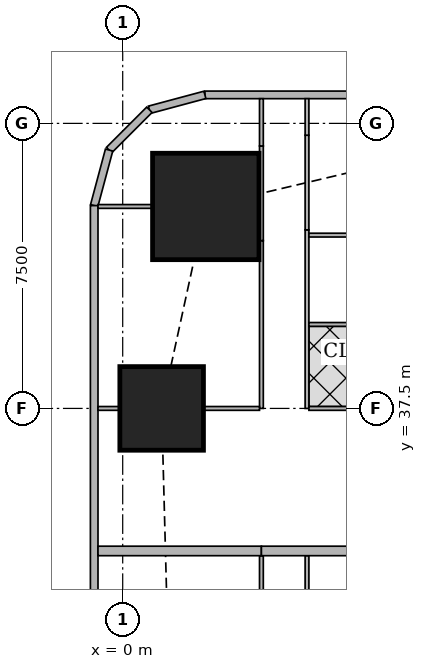
"""IFC4 building model, lengths in metres.
Left out: names, types, materials, properties, quantities, classifications, styles, units other than length and angle.
Written with IfcOpenShell. Run it as: python <this file> out.ifc"""

import sys

from ifc_helpers import new_model, si_unit, direction, frame, frame_2d, origin, origin_2d, place, context, subcontext, project, spatial, rectangle, extrude, element, fill, save


model = new_model("IFC4")
c1 = context("Model", 3, precision=1e-05, world=origin(), true_north=direction((0.0, 1.0)))
c2 = subcontext(c1, "Body", "Model", "MODEL_VIEW")
j1 = project(units=[si_unit("LENGTHUNIT", "METRE"), si_unit("PLANEANGLEUNIT", "RADIAN")], contexts=[c1])
p1 = place(None, origin())
s1 = spatial("IfcSite", under=j1, at=p1, CompositionType="ELEMENT")
p2 = place(p1, origin())
s2 = spatial("IfcBuilding", under=s1, at=p2, CompositionType="ELEMENT")
p3 = place(p2, frame((0.0, 0.0, 81.65)))
s3 = spatial("IfcBuildingStorey", under=s2, at=p3, CompositionType="ELEMENT", Elevation=81.65)
p4 = place(p3, frame((1.025, 37.5, 0.0), z_axis=(0.0, 0.0, 1.0), x_axis=(1.0, 0.0, 0.0)))
e1 = element("IfcColumn", 1, at=p4, inside=s3, PredefinedType="COLUMN", context=c2, shape_type="SweptSolid", body=[
    extrude(rectangle(XDim=2.2, YDim=2.2, at=origin_2d()), origin(), (0.0, 0.0, 1.0), 3.75),
])
p5 = place(p3, frame((2.186, 42.814, 0.0), z_axis=(0.0, 0.0, 1.0), x_axis=(1.0, 0.0, 0.0)))
e2 = element("IfcColumn", 2, at=p5, inside=s3, PredefinedType="COLUMN", context=c2, shape_type="SweptSolid", body=[
    extrude(rectangle(XDim=2.8, YDim=2.8, at=origin_2d()), origin(), (0.0, 0.0, 1.0), 3.75),
])
p6 = place(p3, frame((40.106, 45.75, 0.0), z_axis=(0.0, 0.0, 1.0), x_axis=(-1.0, 0.0, 0.0)))
e3 = element("IfcWall", 3, at=p6, inside=s3, PredefinedType="SOLIDWALL", context=c2, shape_type="SweptSolid", body=[
    extrude(rectangle(XDim=37.943, YDim=0.2, at=frame_2d((18.971, 0.0))), origin(), (0.0, 0.0, 1.0), 3.5),
])
p7 = place(p6, frame((8.606, 0.0, 0.9)))
e4 = element("IfcOpeningElement", 4, at=p7, cuts=e3, PredefinedType="OPENING", context=c2, shape_type="SweptSolid", body=[
    extrude(rectangle(XDim=1.8, YDim=1.5, at=frame_2d((0.9, 0.75))), frame((0.0, 0.11, 0.0), z_axis=(0.0, -1.0, 0.0), x_axis=(1.0, 0.0, 0.0)), (0.0, 0.0, 1.0), 0.22),
])
p8 = place(p6, frame((12.206, 0.0, 0.9)))
e5 = element("IfcOpeningElement", 5, at=p8, cuts=e3, PredefinedType="OPENING", context=c2, shape_type="SweptSolid", body=[
    extrude(rectangle(XDim=1.8, YDim=1.5, at=frame_2d((0.9, 0.75))), frame((0.0, 0.11, 0.0), z_axis=(0.0, -1.0, 0.0), x_axis=(1.0, 0.0, 0.0)), (0.0, 0.0, 1.0), 0.22),
])
p9 = place(p6, frame((15.806, 0.0, 0.9)))
e6 = element("IfcOpeningElement", 6, at=p9, cuts=e3, PredefinedType="OPENING", context=c2, shape_type="SweptSolid", body=[
    extrude(rectangle(XDim=1.8, YDim=1.5, at=frame_2d((0.9, 0.75))), frame((0.0, 0.11, 0.0), z_axis=(0.0, -1.0, 0.0), x_axis=(1.0, 0.0, 0.0)), (0.0, 0.0, 1.0), 0.22),
])
p10 = place(p6, frame((19.406, 0.0, 0.9)))
e7 = element("IfcOpeningElement", 7, at=p10, cuts=e3, PredefinedType="OPENING", context=c2, shape_type="SweptSolid", body=[
    extrude(rectangle(XDim=1.8, YDim=1.5, at=frame_2d((0.9, 0.75))), frame((0.0, 0.11, 0.0), z_axis=(0.0, -1.0, 0.0), x_axis=(1.0, 0.0, 0.0)), (0.0, 0.0, 1.0), 0.22),
])
p11 = place(p6, frame((23.006, 0.0, 0.9)))
e8 = element("IfcOpeningElement", 8, at=p11, cuts=e3, PredefinedType="OPENING", context=c2, shape_type="SweptSolid", body=[
    extrude(rectangle(XDim=1.8, YDim=1.5, at=frame_2d((0.9, 0.75))), frame((0.0, 0.11, 0.0), z_axis=(0.0, -1.0, 0.0), x_axis=(1.0, 0.0, 0.0)), (0.0, 0.0, 1.0), 0.22),
])
p12 = place(p6, frame((26.606, 0.0, 0.9)))
e9 = element("IfcOpeningElement", 9, at=p12, cuts=e3, PredefinedType="OPENING", context=c2, shape_type="SweptSolid", body=[
    extrude(rectangle(XDim=1.8, YDim=1.5, at=frame_2d((0.9, 0.75))), frame((0.0, 0.11, 0.0), z_axis=(0.0, -1.0, 0.0), x_axis=(1.0, 0.0, 0.0)), (0.0, 0.0, 1.0), 0.22),
])
p13 = place(p3, frame((2.163, 45.75, 0.0), z_axis=(0.0, 0.0, 1.0), x_axis=(-0.965832000415, -0.259168954497, 0.0)))
e10 = element("IfcWall", 10, at=p13, inside=s3, PredefinedType="SOLIDWALL", context=c2, shape_type="SweptSolid", body=[
    extrude(rectangle(XDim=1.513, YDim=0.2, at=frame_2d((0.756, 0.0))), origin(), (0.0, 0.0, 1.0), 3.5),
])
p14 = place(p3, frame((0.702, 45.358, 0.0), z_axis=(0.0, 0.0, 1.0), x_axis=(-0.707106781187, -0.707106781187, 0.0)))
e11 = element("IfcWall", 11, at=p14, inside=s3, PredefinedType="SOLIDWALL", context=c2, shape_type="SweptSolid", body=[
    extrude(rectangle(XDim=1.499, YDim=0.2, at=frame_2d((0.75, 0.0))), origin(), (0.0, 0.0, 1.0), 3.5),
])
p15 = place(p3, frame((-0.358, 44.298, 0.0), z_axis=(0.0, 0.0, 1.0), x_axis=(-0.259168954497, -0.965832000415, 0.0)))
e12 = element("IfcWall", 12, at=p15, inside=s3, PredefinedType="SOLIDWALL", context=c2, shape_type="SweptSolid", body=[
    extrude(rectangle(XDim=1.513, YDim=0.2, at=frame_2d((0.756, 0.0))), origin(), (0.0, 0.0, 1.0), 3.5),
])
p16 = place(p3, frame((-0.75, 42.837, 0.0), z_axis=(0.0, 0.0, 1.0), x_axis=(0.0, -1.0, 0.0)))
e13 = element("IfcWall", 13, at=p16, inside=s3, PredefinedType="SOLIDWALL", context=c2, shape_type="SweptSolid", body=[
    extrude(rectangle(XDim=40.674, YDim=0.2, at=frame_2d((20.337, 0.0))), origin(), (0.0, 0.0, 1.0), 3.5),
])
p17 = place(p16, frame((1.78, 0.0, 0.9)))
e14 = element("IfcOpeningElement", 14, at=p17, cuts=e13, PredefinedType="OPENING", context=c2, shape_type="SweptSolid", body=[
    extrude(rectangle(XDim=1.8, YDim=1.5, at=frame_2d((0.9, 0.75))), frame((0.0, 0.11, 0.0), z_axis=(0.0, -1.0, 0.0), x_axis=(1.0, 0.0, 0.0)), (0.0, 0.0, 1.0), 0.22),
])
p18 = place(p16, frame((6.312, 0.0, 0.9)))
e15 = element("IfcOpeningElement", 15, at=p18, cuts=e13, PredefinedType="OPENING", context=c2, shape_type="SweptSolid", body=[
    extrude(rectangle(XDim=1.8, YDim=1.5, at=frame_2d((0.9, 0.75))), frame((0.0, 0.11, 0.0), z_axis=(0.0, -1.0, 0.0), x_axis=(1.0, 0.0, 0.0)), (0.0, 0.0, 1.0), 0.22),
])
p19 = place(p16, frame((10.062, 0.0, 0.9)))
e16 = element("IfcOpeningElement", 16, at=p19, cuts=e13, PredefinedType="OPENING", context=c2, shape_type="SweptSolid", body=[
    extrude(rectangle(XDim=1.8, YDim=1.5, at=frame_2d((0.9, 0.75))), frame((0.0, 0.11, 0.0), z_axis=(0.0, -1.0, 0.0), x_axis=(1.0, 0.0, 0.0)), (0.0, 0.0, 1.0), 0.22),
])
p20 = place(p16, frame((13.812, 0.0, 0.9)))
e17 = element("IfcOpeningElement", 17, at=p20, cuts=e13, PredefinedType="OPENING", context=c2, shape_type="SweptSolid", body=[
    extrude(rectangle(XDim=1.8, YDim=1.5, at=frame_2d((0.9, 0.75))), frame((0.0, 0.11, 0.0), z_axis=(0.0, -1.0, 0.0), x_axis=(1.0, 0.0, 0.0)), (0.0, 0.0, 1.0), 0.22),
])
p21 = place(p16, frame((17.562, 0.0, 0.9)))
e18 = element("IfcOpeningElement", 18, at=p21, cuts=e13, PredefinedType="OPENING", context=c2, shape_type="SweptSolid", body=[
    extrude(rectangle(XDim=1.8, YDim=1.5, at=frame_2d((0.9, 0.75))), frame((0.0, 0.11, 0.0), z_axis=(0.0, -1.0, 0.0), x_axis=(1.0, 0.0, 0.0)), (0.0, 0.0, 1.0), 0.22),
])
p22 = place(p16, frame((21.312, 0.0, 0.9)))
e19 = element("IfcOpeningElement", 19, at=p22, cuts=e13, PredefinedType="OPENING", context=c2, shape_type="SweptSolid", body=[
    extrude(rectangle(XDim=1.8, YDim=1.5, at=frame_2d((0.9, 0.75))), frame((0.0, 0.11, 0.0), z_axis=(0.0, -1.0, 0.0), x_axis=(1.0, 0.0, 0.0)), (0.0, 0.0, 1.0), 0.22),
])
p23 = place(p16, frame((25.062, 0.0, 0.9)))
e20 = element("IfcOpeningElement", 20, at=p23, cuts=e13, PredefinedType="OPENING", context=c2, shape_type="SweptSolid", body=[
    extrude(rectangle(XDim=1.8, YDim=1.5, at=frame_2d((0.9, 0.75))), frame((0.0, 0.11, 0.0), z_axis=(0.0, -1.0, 0.0), x_axis=(1.0, 0.0, 0.0)), (0.0, 0.0, 1.0), 0.22),
])
p24 = place(p16, frame((28.812, 0.0, 0.9)))
e21 = element("IfcOpeningElement", 21, at=p24, cuts=e13, PredefinedType="OPENING", context=c2, shape_type="SweptSolid", body=[
    extrude(rectangle(XDim=1.8, YDim=1.5, at=frame_2d((0.9, 0.75))), frame((0.0, 0.11, 0.0), z_axis=(0.0, -1.0, 0.0), x_axis=(1.0, 0.0, 0.0)), (0.0, 0.0, 1.0), 0.22),
])
p25 = place(p16, frame((32.562, 0.0, 0.9)))
e22 = element("IfcOpeningElement", 22, at=p25, cuts=e13, PredefinedType="OPENING", context=c2, shape_type="SweptSolid", body=[
    extrude(rectangle(XDim=1.8, YDim=1.5, at=frame_2d((0.9, 0.75))), frame((0.0, 0.11, 0.0), z_axis=(0.0, -1.0, 0.0), x_axis=(1.0, 0.0, 0.0)), (0.0, 0.0, 1.0), 0.22),
])
p26 = place(p16, frame((37.094, 0.0, 0.9)))
e23 = element("IfcOpeningElement", 23, at=p26, cuts=e13, PredefinedType="OPENING", context=c2, shape_type="SweptSolid", body=[
    extrude(rectangle(XDim=1.8, YDim=1.5, at=frame_2d((0.9, 0.75))), frame((0.0, 0.11, 0.0), z_axis=(0.0, -1.0, 0.0), x_axis=(1.0, 0.0, 0.0)), (0.0, 0.0, 1.0), 0.22),
])
p27 = place(p3, frame((3.65, 26.25, 0.0), z_axis=(0.0, 0.0, 1.0), x_axis=(0.0, 1.0, 0.0)))
e24 = element("IfcWall", 24, at=p27, inside=s3, PredefinedType="PARTITIONING", context=c2, shape_type="SweptSolid", body=[
    extrude(rectangle(XDim=7.375, YDim=0.1, at=frame_2d((3.688, 0.0))), origin(), (0.0, 0.0, 1.0), 3.5),
])
p28 = place(p27, frame((0.2, 0.0, 0.0)))
e25 = element("IfcOpeningElement", 25, at=p28, cuts=e24, PredefinedType="OPENING", context=c2, shape_type="SweptSolid", body=[
    extrude(rectangle(XDim=0.9, YDim=2.1, at=frame_2d((0.45, 1.05))), frame((0.0, 0.06, 0.0), z_axis=(0.0, -1.0, 0.0), x_axis=(1.0, 0.0, 0.0)), (0.0, 0.0, 1.0), 0.12),
])
p29 = place(p27, frame((3.95, 0.0, 0.0)))
e26 = element("IfcOpeningElement", 26, at=p29, cuts=e24, PredefinedType="OPENING", context=c2, shape_type="SweptSolid", body=[
    extrude(rectangle(XDim=0.9, YDim=2.1, at=frame_2d((0.45, 1.05))), frame((0.0, 0.06, 0.0), z_axis=(0.0, -1.0, 0.0), x_axis=(1.0, 0.0, 0.0)), (0.0, 0.0, 1.0), 0.12),
])
p30 = place(p3, frame((4.85, 26.25, 0.0), z_axis=(0.0, 0.0, 1.0), x_axis=(0.0, 1.0, 0.0)))
e27 = element("IfcWall", 27, at=p30, inside=s3, PredefinedType="PARTITIONING", context=c2, shape_type="SweptSolid", body=[
    extrude(rectangle(XDim=7.375, YDim=0.1, at=frame_2d((3.688, 0.0))), origin(), (0.0, 0.0, 1.0), 3.5),
])
p31 = place(p30, frame((0.655, 0.0, 0.0)))
e28 = element("IfcOpeningElement", 28, at=p31, cuts=e27, PredefinedType="OPENING", context=c2, shape_type="SweptSolid", body=[
    extrude(rectangle(XDim=0.9, YDim=2.1, at=frame_2d((0.45, 1.05))), frame((0.0, 0.06, 0.0), z_axis=(0.0, -1.0, 0.0), x_axis=(1.0, 0.0, 0.0)), (0.0, 0.0, 1.0), 0.12),
])
p32 = place(p30, frame((4.1, 0.0, 0.0)))
e29 = element("IfcOpeningElement", 29, at=p32, cuts=e27, PredefinedType="OPENING", context=c2, shape_type="SweptSolid", body=[
    extrude(rectangle(XDim=0.9, YDim=2.1, at=frame_2d((0.45, 1.05))), frame((0.0, 0.06, 0.0), z_axis=(0.0, -1.0, 0.0), x_axis=(1.0, 0.0, 0.0)), (0.0, 0.0, 1.0), 0.12),
])
p33 = place(p30, frame((2.53, 0.0, 0.0)))
e30 = element("IfcOpeningElement", 30, at=p33, cuts=e27, PredefinedType="OPENING", context=c2, shape_type="SweptSolid", body=[
    extrude(rectangle(XDim=0.9, YDim=2.1, at=frame_2d((0.45, 1.05))), frame((0.0, 0.06, 0.0), z_axis=(0.0, -1.0, 0.0), x_axis=(1.0, 0.0, 0.0)), (0.0, 0.0, 1.0), 0.12),
])
p34 = place(p30, frame((5.975, 0.0, 0.0)))
e31 = element("IfcOpeningElement", 31, at=p34, cuts=e27, PredefinedType="OPENING", context=c2, shape_type="SweptSolid", body=[
    extrude(rectangle(XDim=0.9, YDim=2.1, at=frame_2d((0.45, 1.05))), frame((0.0, 0.06, 0.0), z_axis=(0.0, -1.0, 0.0), x_axis=(1.0, 0.0, 0.0)), (0.0, 0.0, 1.0), 0.12),
])
p35 = place(p3, frame((3.65, 37.5, 0.0), z_axis=(0.0, 0.0, 1.0), x_axis=(0.0, 1.0, 0.0)))
e32 = element("IfcWall", 32, at=p35, inside=s3, PredefinedType="PARTITIONING", context=c2, shape_type="SweptSolid", body=[
    extrude(rectangle(XDim=4.415, YDim=0.1, at=frame_2d((2.208, 0.0))), origin(), (0.0, 0.0, 1.0), 3.5),
])
p36 = place(p35, frame((0.2, 0.0, 0.0)))
e33 = element("IfcOpeningElement", 33, at=p36, cuts=e32, PredefinedType="OPENING", context=c2, shape_type="SweptSolid", body=[
    extrude(rectangle(XDim=0.9, YDim=2.1, at=frame_2d((0.45, 1.05))), frame((0.0, 0.06, 0.0), z_axis=(0.0, -1.0, 0.0), x_axis=(1.0, 0.0, 0.0)), (0.0, 0.0, 1.0), 0.12),
])
p37 = place(p3, frame((3.65, 41.915, 0.0), z_axis=(0.0, 0.0, 1.0), x_axis=(0.0, 1.0, 0.0)))
e34 = element("IfcWall", 34, at=p37, inside=s3, PredefinedType="PARTITIONING", context=c2, shape_type="SweptSolid", body=[
    extrude(rectangle(XDim=2.49, YDim=0.1, at=frame_2d((1.245, 0.0))), origin(), (0.0, 0.0, 1.0), 2.05),
])
p38 = place(p3, frame((3.65, 44.405, 0.0), z_axis=(0.0, 0.0, 1.0), x_axis=(0.0, 1.0, 0.0)))
e35 = element("IfcWall", 35, at=p38, inside=s3, PredefinedType="PARTITIONING", context=c2, shape_type="SweptSolid", body=[
    extrude(rectangle(XDim=1.245, YDim=0.1, at=frame_2d((0.623, 0.0))), origin(), (0.0, 0.0, 1.0), 3.5),
])
p39 = place(p3, frame((4.85, 37.5, 0.0), z_axis=(0.0, 0.0, 1.0), x_axis=(0.0, 1.0, 0.0)))
e36 = element("IfcWall", 36, at=p39, inside=s3, PredefinedType="PARTITIONING", context=c2, shape_type="SweptSolid", body=[
    extrude(rectangle(XDim=4.699, YDim=0.1, at=frame_2d((2.35, 0.0))), origin(), (0.0, 0.0, 1.0), 3.5),
])
p40 = place(p39, frame((0.655, 0.0, 0.0)))
e37 = element("IfcOpeningElement", 37, at=p40, cuts=e36, PredefinedType="OPENING", context=c2, shape_type="SweptSolid", body=[
    extrude(rectangle(XDim=0.9, YDim=2.1, at=frame_2d((0.45, 1.05))), frame((0.0, 0.06, 0.0), z_axis=(0.0, -1.0, 0.0), x_axis=(1.0, 0.0, 0.0)), (0.0, 0.0, 1.0), 0.12),
])
p41 = place(p39, frame((2.53, 0.0, 0.0)))
e38 = element("IfcOpeningElement", 38, at=p41, cuts=e36, PredefinedType="OPENING", context=c2, shape_type="SweptSolid", body=[
    extrude(rectangle(XDim=0.9, YDim=2.1, at=frame_2d((0.45, 1.05))), frame((0.0, 0.06, 0.0), z_axis=(0.0, -1.0, 0.0), x_axis=(1.0, 0.0, 0.0)), (0.0, 0.0, 1.0), 0.12),
])
p42 = place(p3, frame((4.85, 42.199, 0.0), z_axis=(0.0, 0.0, 1.0), x_axis=(0.0, 1.0, 0.0)))
e39 = element("IfcWall", 39, at=p42, inside=s3, PredefinedType="PARTITIONING", context=c2, shape_type="SweptSolid", body=[
    extrude(rectangle(XDim=2.49, YDim=0.1, at=frame_2d((1.245, 0.0))), origin(), (0.0, 0.0, 1.0), 2.05),
])
p43 = place(p3, frame((4.85, 44.689, 0.0), z_axis=(0.0, 0.0, 1.0), x_axis=(0.0, 1.0, 0.0)))
e40 = element("IfcWall", 40, at=p43, inside=s3, PredefinedType="PARTITIONING", context=c2, shape_type="SweptSolid", body=[
    extrude(rectangle(XDim=0.961, YDim=0.1, at=frame_2d((0.48, 0.0))), origin(), (0.0, 0.0, 1.0), 3.5),
])
p44 = place(p3, frame((-0.65, 37.5, 0.0), z_axis=(0.0, 0.0, 1.0), x_axis=(1.0, 0.0, 0.0)))
e41 = element("IfcWall", 41, at=p44, inside=s3, PredefinedType="PARTITIONING", context=c2, shape_type="SweptSolid", body=[
    extrude(rectangle(XDim=0.574, YDim=0.1, at=frame_2d((0.287, 0.0))), origin(), (0.0, 0.0, 1.0), 2.05),
])
p45 = place(p3, frame((2.126, 37.5, 0.0), z_axis=(0.0, 0.0, 1.0), x_axis=(1.0, 0.0, 0.0)))
e42 = element("IfcWall", 42, at=p45, inside=s3, PredefinedType="PARTITIONING", context=c2, shape_type="SweptSolid", body=[
    extrude(rectangle(XDim=1.474, YDim=0.1, at=frame_2d((0.737, 0.0))), origin(), (0.0, 0.0, 1.0), 2.05),
])
p46 = place(p3, frame((-0.65, 42.814, 0.0), z_axis=(0.0, 0.0, 1.0), x_axis=(1.0, 0.0, 0.0)))
e43 = element("IfcWall", 43, at=p46, inside=s3, PredefinedType="PARTITIONING", context=c2, shape_type="SweptSolid", body=[
    extrude(rectangle(XDim=1.435, YDim=0.1, at=frame_2d((0.717, 0.0))), origin(), (0.0, 0.0, 1.0), 3.5),
])
p47 = place(p3, frame((4.9, 37.5, 0.0), z_axis=(0.0, 0.0, 1.0), x_axis=(1.0, 0.0, 0.0)))
e44 = element("IfcWall", 44, at=p47, inside=s3, PredefinedType="PARTITIONING", context=c2, shape_type="SweptSolid", body=[
    extrude(rectangle(XDim=1.499, YDim=0.1, at=frame_2d((0.75, 0.0))), origin(), (0.0, 0.0, 1.0), 3.5),
])
p48 = place(p3, frame((4.9, 39.71, 0.0), z_axis=(0.0, 0.0, 1.0), x_axis=(1.0, 0.0, 0.0)))
e45 = element("IfcWall", 45, at=p48, inside=s3, PredefinedType="PARTITIONING", context=c2, shape_type="SweptSolid", body=[
    extrude(rectangle(XDim=3.275, YDim=0.1, at=frame_2d((1.638, 0.0))), origin(), (0.0, 0.0, 1.0), 3.5),
])
p49 = place(p3, frame((-0.65, 33.75, 0.0), z_axis=(0.0, 0.0, 1.0), x_axis=(1.0, 0.0, 0.0)))
e46 = element("IfcWall", 46, at=p49, inside=s3, PredefinedType="SOLIDWALL", context=c2, shape_type="SweptSolid", body=[
    extrude(rectangle(XDim=4.3, YDim=0.25, at=frame_2d((2.15, 0.0))), origin(), (0.0, 0.0, 1.0), 2.2),
])
p50 = place(p3, frame((3.65, 33.75, 0.0), z_axis=(0.0, 0.0, 1.0), x_axis=(1.0, 0.0, 0.0)))
e47 = element("IfcWall", 47, at=p50, inside=s3, PredefinedType="SOLIDWALL", context=c2, shape_type="SweptSolid", body=[
    extrude(rectangle(XDim=4.525, YDim=0.25, at=frame_2d((2.263, 0.0))), origin(), (0.0, 0.0, 1.0), 3.5),
])
p51 = place(p3, frame((8.175, 42.06, 0.0), z_axis=(0.0, 0.0, 1.0), x_axis=(-1.0, 0.0, 0.0)))
e48 = element("IfcWall", 48, at=p51, inside=s3, PredefinedType="PARTITIONING", context=c2, shape_type="SweptSolid", body=[
    extrude(rectangle(XDim=3.275, YDim=0.1, at=frame_2d((1.638, 0.0))), origin(), (0.0, 0.0, 1.0), 3.5),
])
p52 = place(p51, frame((2.1, 0.0, 0.0)))
e49 = element("IfcOpeningElement", 49, at=p52, cuts=e48, PredefinedType="OPENING", context=c2, shape_type="SweptSolid", body=[
    extrude(rectangle(XDim=0.9, YDim=2.1, at=frame_2d((0.45, 1.05))), frame((0.0, 0.06, 0.0), z_axis=(0.0, -1.0, 0.0), x_axis=(1.0, 0.0, 0.0)), (0.0, 0.0, 1.0), 0.12),
])
p53 = place(p17, origin())
e50 = element("IfcWindow", 50, at=p53, inside=s3, PartitioningType="SINGLE_PANEL", PredefinedType="WINDOW", context=c2, shape_type="SweptSolid", body=[
    extrude(rectangle(XDim=1.8, YDim=1.5, at=frame_2d((0.9, 0.75))), frame((0.0, 0.03, 0.0), z_axis=(0.0, -1.0, 0.0), x_axis=(1.0, 0.0, 0.0)), (0.0, 0.0, 1.0), 0.06),
])
fill(e14, e50)
p54 = place(p18, origin())
e51 = element("IfcWindow", 51, at=p54, inside=s3, PartitioningType="SINGLE_PANEL", PredefinedType="WINDOW", context=c2, shape_type="SweptSolid", body=[
    extrude(rectangle(XDim=1.8, YDim=1.5, at=frame_2d((0.9, 0.75))), frame((0.0, 0.03, 0.0), z_axis=(0.0, -1.0, 0.0), x_axis=(1.0, 0.0, 0.0)), (0.0, 0.0, 1.0), 0.06),
])
fill(e15, e51)
p55 = place(p19, origin())
e52 = element("IfcWindow", 52, at=p55, inside=s3, PartitioningType="SINGLE_PANEL", PredefinedType="WINDOW", context=c2, shape_type="SweptSolid", body=[
    extrude(rectangle(XDim=1.8, YDim=1.5, at=frame_2d((0.9, 0.75))), frame((0.0, 0.03, 0.0), z_axis=(0.0, -1.0, 0.0), x_axis=(1.0, 0.0, 0.0)), (0.0, 0.0, 1.0), 0.06),
])
fill(e16, e52)
p56 = place(p34, origin())
e53 = element("IfcDoor", 53, at=p56, inside=s3, OperationType="SINGLE_SWING_LEFT", PredefinedType="DOOR", context=c2, shape_type="SweptSolid", body=[
    extrude(rectangle(XDim=0.9, YDim=2.1, at=frame_2d((0.45, 1.05))), frame((0.0, 0.025, 0.0), z_axis=(0.0, -1.0, 0.0), x_axis=(1.0, 0.0, 0.0)), (0.0, 0.0, 1.0), 0.05),
])
fill(e31, e53)
p57 = place(p36, origin())
e54 = element("IfcDoor", 54, at=p57, inside=s3, OperationType="SINGLE_SWING_LEFT", PredefinedType="DOOR", context=c2, shape_type="SweptSolid", body=[
    extrude(rectangle(XDim=0.9, YDim=2.1, at=frame_2d((0.45, 1.05))), frame((0.0, 0.025, 0.0), z_axis=(0.0, -1.0, 0.0), x_axis=(1.0, 0.0, 0.0)), (0.0, 0.0, 1.0), 0.05),
])
fill(e33, e54)
p58 = place(p40, origin())
e55 = element("IfcDoor", 55, at=p58, inside=s3, OperationType="SINGLE_SWING_RIGHT", PredefinedType="DOOR", context=c2, shape_type="SweptSolid", body=[
    extrude(rectangle(XDim=0.9, YDim=2.1, at=frame_2d((0.45, 1.05))), frame((0.0, 0.025, 0.0), z_axis=(0.0, -1.0, 0.0), x_axis=(1.0, 0.0, 0.0)), (0.0, 0.0, 1.0), 0.05),
])
fill(e37, e55)
p59 = place(p41, origin())
e56 = element("IfcDoor", 56, at=p59, inside=s3, OperationType="SINGLE_SWING_RIGHT", PredefinedType="DOOR", context=c2, shape_type="SweptSolid", body=[
    extrude(rectangle(XDim=0.9, YDim=2.1, at=frame_2d((0.45, 1.05))), frame((0.0, 0.025, 0.0), z_axis=(0.0, -1.0, 0.0), x_axis=(1.0, 0.0, 0.0)), (0.0, 0.0, 1.0), 0.05),
])
fill(e38, e56)
p60 = place(p52, origin())
e57 = element("IfcDoor", 57, at=p60, inside=s3, OperationType="SINGLE_SWING_LEFT", PredefinedType="DOOR", context=c2, shape_type="SweptSolid", body=[
    extrude(rectangle(XDim=0.9, YDim=2.1, at=frame_2d((0.45, 1.05))), frame((0.0, 0.025, 0.0), z_axis=(0.0, -1.0, 0.0), x_axis=(1.0, 0.0, 0.0)), (0.0, 0.0, 1.0), 0.05),
])
fill(e49, e57)
save(model, sys.argv[1])
